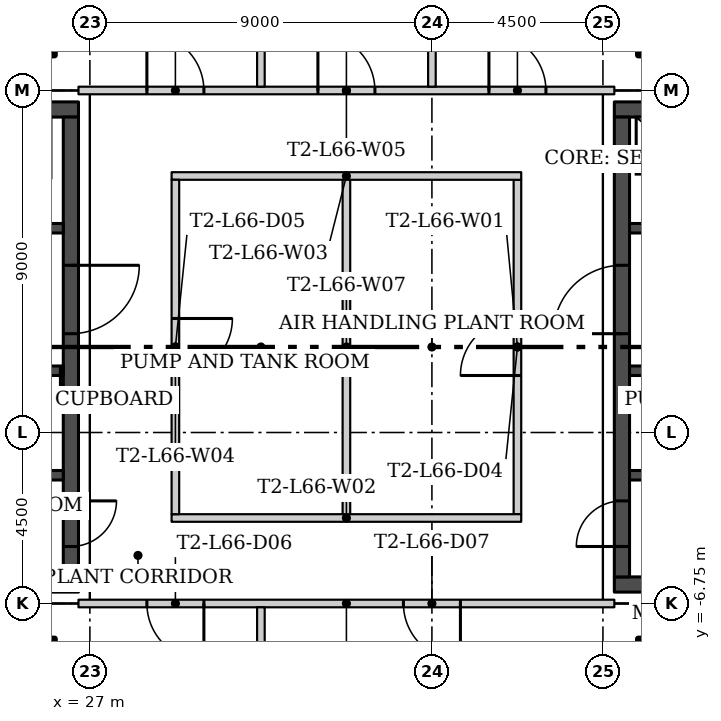
"""IFC4 building model, lengths in metres.
Left out: names, types, materials, properties, quantities, classifications, styles, units other than length and angle.
Written with IfcOpenShell. Run it as: python <this file> out.ifc"""

import sys

from ifc_helpers import new_model, si_unit, direction, frame, frame_2d, origin, origin_2d, place, context, subcontext, project, spatial, rectangle, hollow_rectangle, extrude, element, fill, save


model = new_model("IFC4")
c1 = context("Model", 3, precision=1e-05, world=origin(), true_north=direction((0.0, 1.0)))
c2 = subcontext(c1, "Body", "Model", "MODEL_VIEW")
j1 = project(units=[si_unit("LENGTHUNIT", "METRE"), si_unit("PLANEANGLEUNIT", "RADIAN")], contexts=[c1])
p1 = place(None, origin())
s1 = spatial("IfcSite", under=j1, at=p1, CompositionType="ELEMENT")
p2 = place(p1, origin())
s2 = spatial("IfcBuilding", under=s1, at=p2, CompositionType="ELEMENT")
p3 = place(p2, frame((0.0, 0.0, 273.3)))
s3 = spatial("IfcBuildingStorey", under=s2, at=p3, CompositionType="ELEMENT", Elevation=273.3)
for number, where in (
    (1, (25.625, 8.125, 0.0)),
    (2, (41.875, 8.125, 0.0)),
    (3, (25.625, -8.125, 0.0)),
    (4, (41.875, -8.125, 0.0)),
):
    element("IfcColumn", number, at=place(p3, frame(where)), inside=s3, PredefinedType="COLUMN", context=c2, shape_type="SweptSolid", body=[
        extrude(hollow_rectangle(XDim=0.9, YDim=0.9, WallThickness=0.036, at=origin_2d()), origin(), (0.0, 0.0, 1.0), 4.55),
    ])
p4 = place(p3, frame((38.25, -4.4, 0.0), z_axis=(0.0, 0.0, 1.0), x_axis=(0.0, 1.0, 0.0)))
e5 = element("IfcWall", 5, at=p4, inside=s3, PredefinedType="PARTITIONING", context=c2, shape_type="SweptSolid", body=[
    extrude(rectangle(XDim=8.8, YDim=0.2, at=frame_2d((4.4, 0.0))), origin(), (0.0, 0.0, 1.0), 4.55),
])
p5 = place(p4, frame((3.65, 0.0, 0.0)))
e6 = element("IfcOpeningElement", 6, at=p5, cuts=e5, PredefinedType="OPENING", context=c2, shape_type="SweptSolid", body=[
    extrude(rectangle(XDim=1.5, YDim=2.4, at=frame_2d((0.75, 1.2))), frame((0.0, 0.11, 0.0), z_axis=(0.0, -1.0, 0.0), x_axis=(1.0, 0.0, 0.0)), (0.0, 0.0, 1.0), 0.22),
])
p6 = place(p3, frame((29.15, -4.5, 0.0)))
e7 = element("IfcWall", 7, at=p6, inside=s3, PredefinedType="PARTITIONING", context=c2, shape_type="SweptSolid", body=[
    extrude(rectangle(XDim=9.2, YDim=0.2, at=frame_2d((4.6, 0.0))), origin(), (0.0, 0.0, 1.0), 4.55),
])
p7 = place(p3, frame((38.35, 4.5, 0.0), z_axis=(0.0, 0.0, 1.0), x_axis=(-1.0, 0.0, 0.0)))
e8 = element("IfcWall", 8, at=p7, inside=s3, PredefinedType="PARTITIONING", context=c2, shape_type="SweptSolid", body=[
    extrude(rectangle(XDim=9.2, YDim=0.2, at=frame_2d((4.6, 0.0))), origin(), (0.0, 0.0, 1.0), 4.55),
])
p8 = place(p3, frame((29.25, 4.4, 0.0), z_axis=(0.0, 0.0, 1.0), x_axis=(0.0, -1.0, 0.0)))
e9 = element("IfcWall", 9, at=p8, inside=s3, PredefinedType="PARTITIONING", context=c2, shape_type="SweptSolid", body=[
    extrude(rectangle(XDim=8.8, YDim=0.2, at=frame_2d((4.4, 0.0))), origin(), (0.0, 0.0, 1.0), 4.55),
])
p9 = place(p8, frame((3.65, 0.0, 0.0)))
e10 = element("IfcOpeningElement", 10, at=p9, cuts=e9, PredefinedType="OPENING", context=c2, shape_type="SweptSolid", body=[
    extrude(rectangle(XDim=1.5, YDim=2.4, at=frame_2d((0.75, 1.2))), frame((0.0, 0.11, 0.0), z_axis=(0.0, -1.0, 0.0), x_axis=(1.0, 0.0, 0.0)), (0.0, 0.0, 1.0), 0.22),
])
p10 = place(p3, frame((26.7, 6.75, 0.0)))
e11 = element("IfcWall", 11, at=p10, inside=s3, PredefinedType="PARTITIONING", context=c2, shape_type="SweptSolid", body=[
    extrude(rectangle(XDim=14.1, YDim=0.2, at=frame_2d((7.05, 0.0))), origin(), (0.0, 0.0, 1.0), 4.55),
])
p11 = place(p10, frame((10.8, 0.0, 0.0)))
e12 = element("IfcOpeningElement", 12, at=p11, cuts=e11, PredefinedType="OPENING", context=c2, shape_type="SweptSolid", body=[
    extrude(rectangle(XDim=1.5, YDim=2.4, at=frame_2d((0.75, 1.2))), frame((0.0, 0.11, 0.0), z_axis=(0.0, -1.0, 0.0), x_axis=(1.0, 0.0, 0.0)), (0.0, 0.0, 1.0), 0.22),
])
p12 = place(p10, frame((6.3, 0.0, 0.0)))
e13 = element("IfcOpeningElement", 13, at=p12, cuts=e11, PredefinedType="OPENING", context=c2, shape_type="SweptSolid", body=[
    extrude(rectangle(XDim=1.5, YDim=2.4, at=frame_2d((0.75, 1.2))), frame((0.0, 0.11, 0.0), z_axis=(0.0, -1.0, 0.0), x_axis=(1.0, 0.0, 0.0)), (0.0, 0.0, 1.0), 0.22),
])
p13 = place(p10, frame((1.8, 0.0, 0.0)))
e14 = element("IfcOpeningElement", 14, at=p13, cuts=e11, PredefinedType="OPENING", context=c2, shape_type="SweptSolid", body=[
    extrude(rectangle(XDim=1.5, YDim=2.4, at=frame_2d((0.75, 1.2))), frame((0.0, 0.11, 0.0), z_axis=(0.0, -1.0, 0.0), x_axis=(1.0, 0.0, 0.0)), (0.0, 0.0, 1.0), 0.22),
])
p14 = place(p3, frame((40.8, -6.75, 0.0), z_axis=(0.0, 0.0, 1.0), x_axis=(-1.0, 0.0, 0.0)))
e15 = element("IfcWall", 15, at=p14, inside=s3, PredefinedType="PARTITIONING", context=c2, shape_type="SweptSolid", body=[
    extrude(rectangle(XDim=14.1, YDim=0.2, at=frame_2d((7.05, 0.0))), origin(), (0.0, 0.0, 1.0), 4.55),
])
p15 = place(p14, frame((10.8, 0.0, 0.0)))
e16 = element("IfcOpeningElement", 16, at=p15, cuts=e15, PredefinedType="OPENING", context=c2, shape_type="SweptSolid", body=[
    extrude(rectangle(XDim=1.5, YDim=2.4, at=frame_2d((0.75, 1.2))), frame((0.0, 0.11, 0.0), z_axis=(0.0, -1.0, 0.0), x_axis=(1.0, 0.0, 0.0)), (0.0, 0.0, 1.0), 0.22),
])
p16 = place(p14, frame((4.05, 0.0, 0.0)))
e17 = element("IfcOpeningElement", 17, at=p16, cuts=e15, PredefinedType="OPENING", context=c2, shape_type="SweptSolid", body=[
    extrude(rectangle(XDim=1.5, YDim=2.4, at=frame_2d((0.75, 1.2))), frame((0.0, 0.11, 0.0), z_axis=(0.0, -1.0, 0.0), x_axis=(1.0, 0.0, 0.0)), (0.0, 0.0, 1.0), 0.22),
])
p17 = place(p3, frame((33.75, 4.4, 0.0), z_axis=(0.0, 0.0, 1.0), x_axis=(0.0, -1.0, 0.0)))
e18 = element("IfcWall", 18, at=p17, inside=s3, PredefinedType="PARTITIONING", context=c2, shape_type="SweptSolid", body=[
    extrude(rectangle(XDim=8.8, YDim=0.2, at=frame_2d((4.4, 0.0))), origin(), (0.0, 0.0, 1.0), 4.55),
])
p18 = place(p3, frame((36.0, 20.155, 0.0), z_axis=(0.0, 0.0, 1.0), x_axis=(0.0, -1.0, 0.0)))
e19 = element("IfcWall", 19, at=p18, inside=s3, PredefinedType="PARTITIONING", context=c2, shape_type="SweptSolid", body=[
    extrude(rectangle(XDim=13.305, YDim=0.2, at=frame_2d((6.652, 0.0))), origin(), (0.0, 0.0, 1.0), 4.55),
])
p19 = place(p3, frame((31.5, -6.85, 0.0), z_axis=(0.0, 0.0, 1.0), x_axis=(0.0, -1.0, 0.0)))
e20 = element("IfcWall", 20, at=p19, inside=s3, PredefinedType="PARTITIONING", context=c2, shape_type="SweptSolid", body=[
    extrude(rectangle(XDim=8.805, YDim=0.2, at=frame_2d((4.402, 0.0))), origin(), (0.0, 0.0, 1.0), 4.55),
])
p20 = place(p3, frame((31.5, 20.155, 0.0), z_axis=(0.0, 0.0, 1.0), x_axis=(0.0, -1.0, 0.0)))
e21 = element("IfcWall", 21, at=p20, inside=s3, PredefinedType="PARTITIONING", context=c2, shape_type="SweptSolid", body=[
    extrude(rectangle(XDim=13.305, YDim=0.2, at=frame_2d((6.652, 0.0))), origin(), (0.0, 0.0, 1.0), 4.55),
])
for number, where in (
    (22, (13.8, -6.25, 0.0)),
    (23, (13.8, 6.25, 0.0)),
):
    element("IfcWall", number, at=place(p3, frame(where)), inside=s3, PredefinedType="SHEAR", context=c2, shape_type="SweptSolid", body=[
        extrude(rectangle(XDim=12.9, YDim=0.4, at=frame_2d((6.45, 0.0))), origin(), (0.0, 0.0, 1.0), 4.55),
    ])
p21 = place(p3, frame((26.5, 6.05, 0.0), z_axis=(0.0, 0.0, 1.0), x_axis=(0.0, -1.0, 0.0)))
e24 = element("IfcWall", 24, at=p21, inside=s3, PredefinedType="SHEAR", context=c2, shape_type="SweptSolid", body=[
    extrude(rectangle(XDim=12.1, YDim=0.4, at=frame_2d((6.05, 0.0))), origin(), (0.0, 0.0, 1.0), 4.55),
])
p22 = place(p21, frame((10.1, 0.0, 0.0)))
e25 = element("IfcOpeningElement", 25, at=p22, cuts=e24, PredefinedType="OPENING", context=c2, shape_type="SweptSolid", body=[
    extrude(rectangle(XDim=1.2, YDim=2.1, at=frame_2d((0.6, 1.05))), frame((0.0, 0.21, 0.0), z_axis=(0.0, -1.0, 0.0), x_axis=(1.0, 0.0, 0.0)), (0.0, 0.0, 1.0), 0.42),
])
p23 = place(p21, frame((3.9, 0.0, 0.0)))
e26 = element("IfcOpeningElement", 26, at=p23, cuts=e24, PredefinedType="OPENING", context=c2, shape_type="SweptSolid", body=[
    extrude(rectangle(XDim=1.8, YDim=2.4, at=frame_2d((0.9, 1.2))), frame((0.0, 0.21, 0.0), z_axis=(0.0, -1.0, 0.0), x_axis=(1.0, 0.0, 0.0)), (0.0, 0.0, 1.0), 0.42),
])
p24 = place(p3, frame((26.3, -3.375, 0.0), z_axis=(0.0, 0.0, 1.0), x_axis=(-1.0, 0.0, 0.0)))
e27 = element("IfcWall", 27, at=p24, inside=s3, PredefinedType="SHEAR", context=c2, shape_type="SweptSolid", body=[
    extrude(rectangle(XDim=12.1, YDim=0.25, at=frame_2d((6.05, 0.0))), origin(), (0.0, 0.0, 1.0), 4.55),
])
p25 = place(p24, frame((10.95, 0.0, 0.0)))
e28 = element("IfcOpeningElement", 28, at=p25, cuts=e27, PredefinedType="OPENING", context=c2, shape_type="SweptSolid", body=[
    extrude(rectangle(XDim=1.1, YDim=2.1, at=frame_2d((0.55, 1.05))), frame((0.0, 0.135, 0.0), z_axis=(0.0, -1.0, 0.0), x_axis=(1.0, 0.0, 0.0)), (0.0, 0.0, 1.0), 0.27),
])
p26 = place(p3, frame((26.3, -0.625, 0.0), z_axis=(0.0, 0.0, 1.0), x_axis=(-1.0, 0.0, 0.0)))
e29 = element("IfcWall", 29, at=p26, inside=s3, PredefinedType="SHEAR", context=c2, shape_type="SweptSolid", body=[
    extrude(rectangle(XDim=12.1, YDim=0.25, at=frame_2d((6.05, 0.0))), origin(), (0.0, 0.0, 1.0), 4.55),
])
p27 = place(p26, frame((8.65, 0.0, 0.0)))
e30 = element("IfcOpeningElement", 30, at=p27, cuts=e29, PredefinedType="OPENING", context=c2, shape_type="SweptSolid", body=[
    extrude(rectangle(XDim=1.2, YDim=2.1, at=frame_2d((0.6, 1.05))), frame((0.0, 0.135, 0.0), z_axis=(0.0, -1.0, 0.0), x_axis=(1.0, 0.0, 0.0)), (0.0, 0.0, 1.0), 0.27),
])
p28 = place(p26, frame((1.7, 0.0, 0.0)))
e31 = element("IfcOpeningElement", 31, at=p28, cuts=e29, PredefinedType="OPENING", context=c2, shape_type="SweptSolid", body=[
    extrude(rectangle(XDim=0.9, YDim=2.1, at=frame_2d((0.45, 1.05))), frame((0.0, 0.135, 0.0), z_axis=(0.0, -1.0, 0.0), x_axis=(1.0, 0.0, 0.0)), (0.0, 0.0, 1.0), 0.27),
])
p29 = place(p26, frame((0.075, 0.0, 0.0)))
e32 = element("IfcOpeningElement", 32, at=p29, cuts=e29, PredefinedType="OPENING", context=c2, shape_type="SweptSolid", body=[
    extrude(rectangle(XDim=0.9, YDim=2.1, at=frame_2d((0.45, 1.05))), frame((0.0, 0.135, 0.0), z_axis=(0.0, -1.0, 0.0), x_axis=(1.0, 0.0, 0.0)), (0.0, 0.0, 1.0), 0.27),
])
p30 = place(p3, frame((14.2, 3.125, 0.0)))
e33 = element("IfcWall", 33, at=p30, inside=s3, PredefinedType="SHEAR", context=c2, shape_type="SweptSolid", body=[
    extrude(rectangle(XDim=12.1, YDim=0.25, at=frame_2d((6.05, 0.0))), origin(), (0.0, 0.0, 1.0), 4.55),
])
p31 = place(p30, frame((1.55, 0.0, 0.0)))
e34 = element("IfcOpeningElement", 34, at=p31, cuts=e33, PredefinedType="OPENING", context=c2, shape_type="SweptSolid", body=[
    extrude(rectangle(XDim=0.9, YDim=2.1, at=frame_2d((0.45, 1.05))), frame((0.0, 0.135, 0.0), z_axis=(0.0, -1.0, 0.0), x_axis=(1.0, 0.0, 0.0)), (0.0, 0.0, 1.0), 0.27),
])
p32 = place(p30, frame((4.475, 0.0, 0.0)))
e35 = element("IfcOpeningElement", 35, at=p32, cuts=e33, PredefinedType="OPENING", context=c2, shape_type="SweptSolid", body=[
    extrude(rectangle(XDim=0.9, YDim=2.1, at=frame_2d((0.45, 1.05))), frame((0.0, 0.135, 0.0), z_axis=(0.0, -1.0, 0.0), x_axis=(1.0, 0.0, 0.0)), (0.0, 0.0, 1.0), 0.27),
])
for number, where, z_axis, x_axis in (
    (36, (53.7, -6.25, 0.0), (0.0, 0.0, 1.0), (-1.0, 0.0, 0.0)),
    (37, (53.7, 6.25, 0.0), (0.0, 0.0, 1.0), (-1.0, 0.0, 0.0)),
):
    element("IfcWall", number, at=place(p3, frame(where, z_axis=z_axis, x_axis=x_axis)), inside=s3, PredefinedType="SHEAR", context=c2, shape_type="SweptSolid", body=[
        extrude(rectangle(XDim=12.9, YDim=0.4, at=frame_2d((6.45, 0.0))), origin(), (0.0, 0.0, 1.0), 4.55),
    ])
p33 = place(p3, frame((41.0, -6.05, 0.0), z_axis=(0.0, 0.0, 1.0), x_axis=(0.0, 1.0, 0.0)))
e38 = element("IfcWall", 38, at=p33, inside=s3, PredefinedType="SHEAR", context=c2, shape_type="SweptSolid", body=[
    extrude(rectangle(XDim=12.1, YDim=0.4, at=frame_2d((6.05, 0.0))), origin(), (0.0, 0.0, 1.0), 4.55),
])
p34 = place(p33, frame((0.8, 0.0, 0.0)))
e39 = element("IfcOpeningElement", 39, at=p34, cuts=e38, PredefinedType="OPENING", context=c2, shape_type="SweptSolid", body=[
    extrude(rectangle(XDim=1.2, YDim=2.1, at=frame_2d((0.6, 1.05))), frame((0.0, 0.21, 0.0), z_axis=(0.0, -1.0, 0.0), x_axis=(1.0, 0.0, 0.0)), (0.0, 0.0, 1.0), 0.42),
])
p35 = place(p33, frame((6.4, 0.0, 0.0)))
e40 = element("IfcOpeningElement", 40, at=p35, cuts=e38, PredefinedType="OPENING", context=c2, shape_type="SweptSolid", body=[
    extrude(rectangle(XDim=1.8, YDim=2.4, at=frame_2d((0.9, 1.2))), frame((0.0, 0.21, 0.0), z_axis=(0.0, -1.0, 0.0), x_axis=(1.0, 0.0, 0.0)), (0.0, 0.0, 1.0), 0.42),
])
p36 = place(p3, frame((53.3, -3.375, 0.0), z_axis=(0.0, 0.0, 1.0), x_axis=(-1.0, 0.0, 0.0)))
e41 = element("IfcWall", 41, at=p36, inside=s3, PredefinedType="SHEAR", context=c2, shape_type="SweptSolid", body=[
    extrude(rectangle(XDim=12.1, YDim=0.25, at=frame_2d((6.05, 0.0))), origin(), (0.0, 0.0, 1.0), 4.55),
])
p37 = place(p36, frame((0.05, 0.0, 0.0)))
e42 = element("IfcOpeningElement", 42, at=p37, cuts=e41, PredefinedType="OPENING", context=c2, shape_type="SweptSolid", body=[
    extrude(rectangle(XDim=1.1, YDim=2.1, at=frame_2d((0.55, 1.05))), frame((0.0, 0.135, 0.0), z_axis=(0.0, -1.0, 0.0), x_axis=(1.0, 0.0, 0.0)), (0.0, 0.0, 1.0), 0.27),
])
p38 = place(p3, frame((53.3, -0.625, 0.0), z_axis=(0.0, 0.0, 1.0), x_axis=(-1.0, 0.0, 0.0)))
e43 = element("IfcWall", 43, at=p38, inside=s3, PredefinedType="SHEAR", context=c2, shape_type="SweptSolid", body=[
    extrude(rectangle(XDim=12.1, YDim=0.25, at=frame_2d((6.05, 0.0))), origin(), (0.0, 0.0, 1.0), 4.55),
])
p39 = place(p38, frame((2.25, 0.0, 0.0)))
e44 = element("IfcOpeningElement", 44, at=p39, cuts=e43, PredefinedType="OPENING", context=c2, shape_type="SweptSolid", body=[
    extrude(rectangle(XDim=1.2, YDim=2.1, at=frame_2d((0.6, 1.05))), frame((0.0, 0.135, 0.0), z_axis=(0.0, -1.0, 0.0), x_axis=(1.0, 0.0, 0.0)), (0.0, 0.0, 1.0), 0.27),
])
p40 = place(p38, frame((10.025, 0.0, 0.0)))
e45 = element("IfcOpeningElement", 45, at=p40, cuts=e43, PredefinedType="OPENING", context=c2, shape_type="SweptSolid", body=[
    extrude(rectangle(XDim=0.9, YDim=2.1, at=frame_2d((0.45, 1.05))), frame((0.0, 0.135, 0.0), z_axis=(0.0, -1.0, 0.0), x_axis=(1.0, 0.0, 0.0)), (0.0, 0.0, 1.0), 0.27),
])
p41 = place(p3, frame((41.2, 3.125, 0.0)))
e46 = element("IfcWall", 46, at=p41, inside=s3, PredefinedType="SHEAR", context=c2, shape_type="SweptSolid", body=[
    extrude(rectangle(XDim=4.8, YDim=0.25, at=frame_2d((2.4, 0.0))), origin(), (0.0, 0.0, 1.0), 4.55),
])
p42 = place(p41, frame((3.025, 0.0, 0.0)))
e47 = element("IfcOpeningElement", 47, at=p42, cuts=e46, PredefinedType="OPENING", context=c2, shape_type="SweptSolid", body=[
    extrude(rectangle(XDim=0.9, YDim=2.1, at=frame_2d((0.45, 1.05))), frame((0.0, 0.135, 0.0), z_axis=(0.0, -1.0, 0.0), x_axis=(1.0, 0.0, 0.0)), (0.0, 0.0, 1.0), 0.27),
])
p43 = place(p11, origin())
e48 = element("IfcDoor", 48, at=p43, inside=s3, OperationType="DOUBLE_DOOR_SINGLE_SWING", PredefinedType="DOOR", context=c2, shape_type="SweptSolid", body=[
    extrude(rectangle(XDim=1.5, YDim=2.4, at=frame_2d((0.75, 1.2))), frame((0.0, 0.025, 0.0), z_axis=(0.0, -1.0, 0.0), x_axis=(1.0, 0.0, 0.0)), (0.0, 0.0, 1.0), 0.05),
])
fill(e12, e48)
p44 = place(p12, origin())
e49 = element("IfcDoor", 49, at=p44, inside=s3, OperationType="DOUBLE_DOOR_SINGLE_SWING", PredefinedType="DOOR", context=c2, shape_type="SweptSolid", body=[
    extrude(rectangle(XDim=1.5, YDim=2.4, at=frame_2d((0.75, 1.2))), frame((0.0, 0.025, 0.0), z_axis=(0.0, -1.0, 0.0), x_axis=(1.0, 0.0, 0.0)), (0.0, 0.0, 1.0), 0.05),
])
fill(e13, e49)
p45 = place(p13, origin())
e50 = element("IfcDoor", 50, at=p45, inside=s3, OperationType="DOUBLE_DOOR_SINGLE_SWING", PredefinedType="DOOR", context=c2, shape_type="SweptSolid", body=[
    extrude(rectangle(XDim=1.5, YDim=2.4, at=frame_2d((0.75, 1.2))), frame((0.0, 0.025, 0.0), z_axis=(0.0, -1.0, 0.0), x_axis=(1.0, 0.0, 0.0)), (0.0, 0.0, 1.0), 0.05),
])
fill(e14, e50)
p46 = place(p5, origin())
e51 = element("IfcDoor", 51, at=p46, inside=s3, OperationType="DOUBLE_DOOR_SINGLE_SWING", PredefinedType="DOOR", context=c2, shape_type="SweptSolid", body=[
    extrude(rectangle(XDim=1.5, YDim=2.4, at=frame_2d((0.75, 1.2))), frame((0.0, 0.025, 0.0), z_axis=(0.0, -1.0, 0.0), x_axis=(1.0, 0.0, 0.0)), (0.0, 0.0, 1.0), 0.05),
])
fill(e6, e51)
p47 = place(p9, origin())
e52 = element("IfcDoor", 52, at=p47, inside=s3, OperationType="DOUBLE_DOOR_SINGLE_SWING", PredefinedType="DOOR", context=c2, shape_type="SweptSolid", body=[
    extrude(rectangle(XDim=1.5, YDim=2.4, at=frame_2d((0.75, 1.2))), frame((0.0, 0.025, 0.0), z_axis=(0.0, -1.0, 0.0), x_axis=(1.0, 0.0, 0.0)), (0.0, 0.0, 1.0), 0.05),
])
fill(e10, e52)
p48 = place(p15, origin())
e53 = element("IfcDoor", 53, at=p48, inside=s3, OperationType="DOUBLE_DOOR_SINGLE_SWING", PredefinedType="DOOR", context=c2, shape_type="SweptSolid", body=[
    extrude(rectangle(XDim=1.5, YDim=2.4, at=frame_2d((0.75, 1.2))), frame((0.0, 0.025, 0.0), z_axis=(0.0, -1.0, 0.0), x_axis=(1.0, 0.0, 0.0)), (0.0, 0.0, 1.0), 0.05),
])
fill(e16, e53)
p49 = place(p16, origin())
e54 = element("IfcDoor", 54, at=p49, inside=s3, OperationType="DOUBLE_DOOR_SINGLE_SWING", PredefinedType="DOOR", context=c2, shape_type="SweptSolid", body=[
    extrude(rectangle(XDim=1.5, YDim=2.4, at=frame_2d((0.75, 1.2))), frame((0.0, 0.025, 0.0), z_axis=(0.0, -1.0, 0.0), x_axis=(1.0, 0.0, 0.0)), (0.0, 0.0, 1.0), 0.05),
])
fill(e17, e54)
p50 = place(p22, origin())
e55 = element("IfcDoor", 55, at=p50, inside=s3, OperationType="SINGLE_SWING_RIGHT", PredefinedType="DOOR", context=c2, shape_type="SweptSolid", body=[
    extrude(rectangle(XDim=1.2, YDim=2.1, at=frame_2d((0.6, 1.05))), frame((0.0, 0.025, 0.0), z_axis=(0.0, -1.0, 0.0), x_axis=(1.0, 0.0, 0.0)), (0.0, 0.0, 1.0), 0.05),
])
fill(e25, e55)
p51 = place(p23, origin())
e56 = element("IfcDoor", 56, at=p51, inside=s3, OperationType="DOUBLE_DOOR_SINGLE_SWING", PredefinedType="DOOR", context=c2, shape_type="SweptSolid", body=[
    extrude(rectangle(XDim=1.8, YDim=2.4, at=frame_2d((0.9, 1.2))), frame((0.0, 0.025, 0.0), z_axis=(0.0, -1.0, 0.0), x_axis=(1.0, 0.0, 0.0)), (0.0, 0.0, 1.0), 0.05),
])
fill(e26, e56)
p52 = place(p29, origin())
e57 = element("IfcDoor", 57, at=p52, inside=s3, OperationType="SINGLE_SWING_LEFT", PredefinedType="DOOR", context=c2, shape_type="SweptSolid", body=[
    extrude(rectangle(XDim=0.9, YDim=2.1, at=frame_2d((0.45, 1.05))), frame((0.0, 0.025, 0.0), z_axis=(0.0, -1.0, 0.0), x_axis=(1.0, 0.0, 0.0)), (0.0, 0.0, 1.0), 0.05),
])
fill(e32, e57)
p53 = place(p34, origin())
e58 = element("IfcDoor", 58, at=p53, inside=s3, OperationType="SINGLE_SWING_LEFT", PredefinedType="DOOR", context=c2, shape_type="SweptSolid", body=[
    extrude(rectangle(XDim=1.2, YDim=2.1, at=frame_2d((0.6, 1.05))), frame((0.0, 0.025, 0.0), z_axis=(0.0, -1.0, 0.0), x_axis=(1.0, 0.0, 0.0)), (0.0, 0.0, 1.0), 0.05),
])
fill(e39, e58)
p54 = place(p35, origin())
e59 = element("IfcDoor", 59, at=p54, inside=s3, OperationType="DOUBLE_DOOR_SINGLE_SWING", PredefinedType="DOOR", context=c2, shape_type="SweptSolid", body=[
    extrude(rectangle(XDim=1.8, YDim=2.4, at=frame_2d((0.9, 1.2))), frame((0.0, 0.025, 0.0), z_axis=(0.0, -1.0, 0.0), x_axis=(1.0, 0.0, 0.0)), (0.0, 0.0, 1.0), 0.05),
])
fill(e40, e59)
save(model, sys.argv[1])
